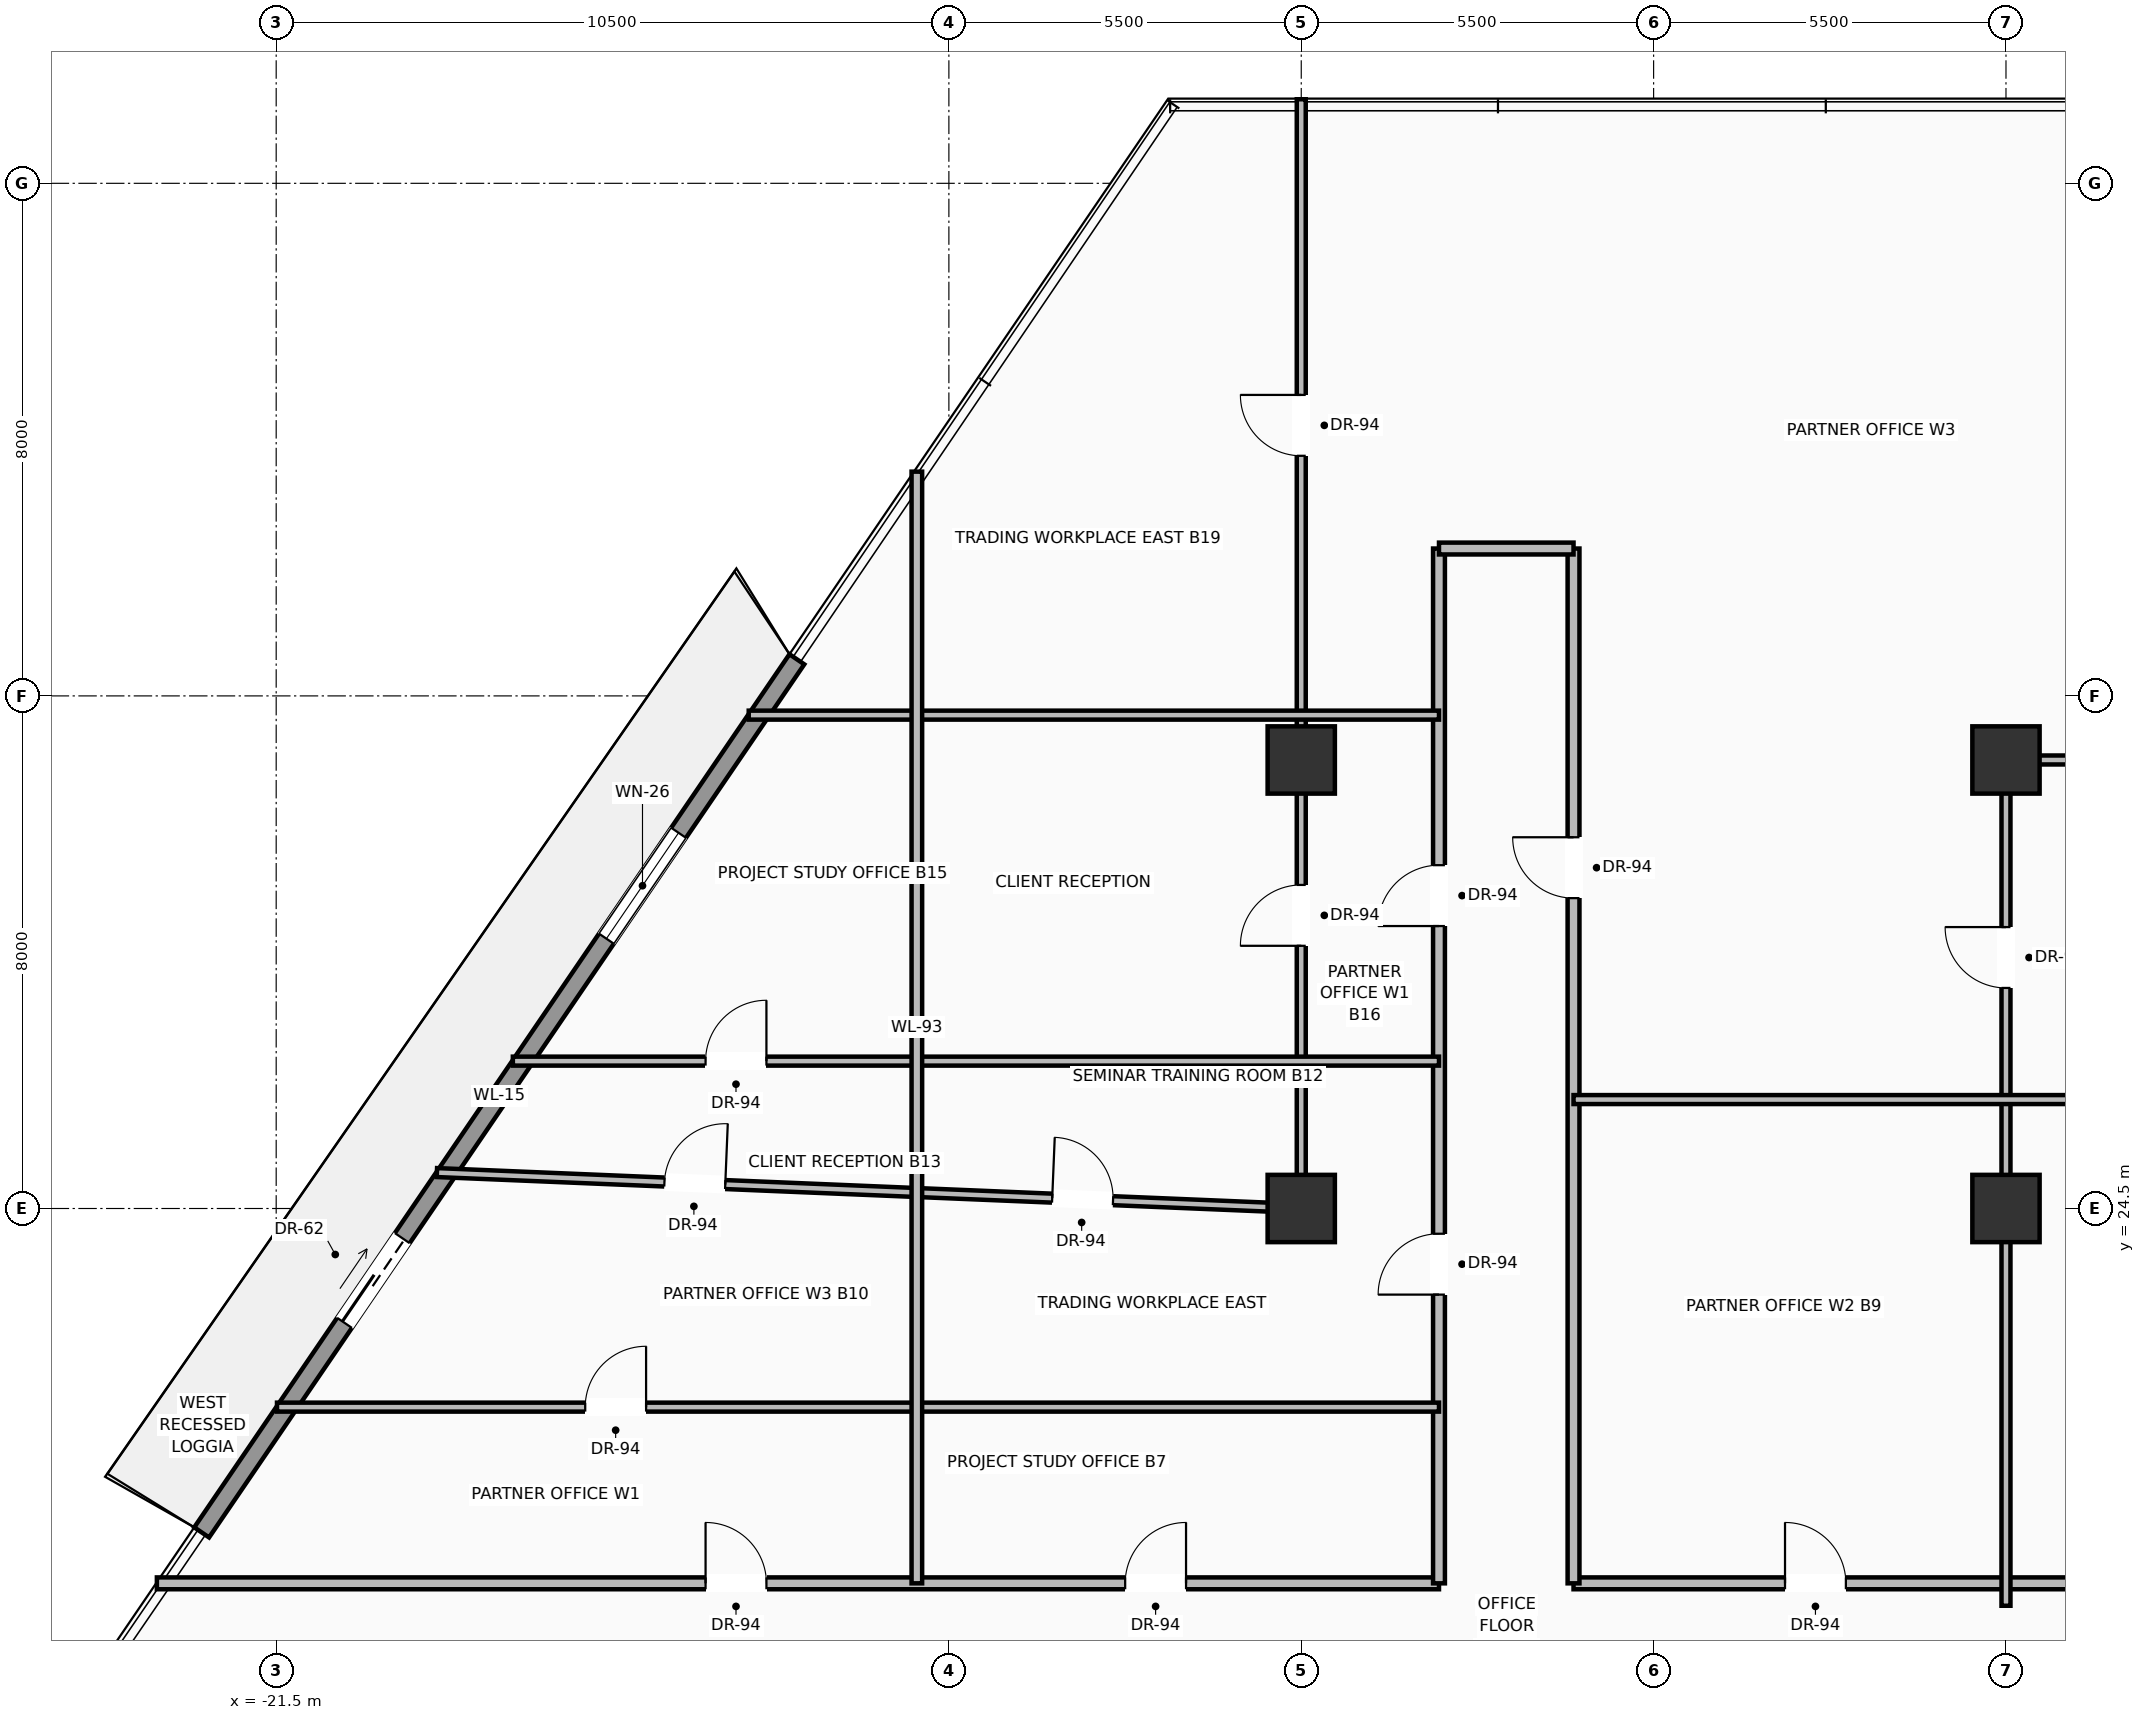
"""IFC4 building model, lengths in metres.
Left out: names, types, materials, properties, quantities, classifications, styles, units other than length and angle.
Written with IfcOpenShell. Run it as: python <this file> out.ifc"""

import sys

from ifc_helpers import new_model, si_unit, direction, frame, frame_2d, origin, origin_2d, place, context, subcontext, project, spatial, rectangle, extrude, source, transform, mapped, element, fill, save


model = new_model("IFC4")
c1 = context("Model", 3, precision=1e-05, world=origin(), true_north=direction((0.0, 1.0)))
c2 = subcontext(c1, "Body", "Model", "MODEL_VIEW")
j1 = project(units=[si_unit("LENGTHUNIT", "METRE"), si_unit("PLANEANGLEUNIT", "RADIAN")], contexts=[c1])
p1 = place(None, origin())
s1 = spatial("IfcSite", under=j1, at=p1, CompositionType="ELEMENT")
p2 = place(p1, origin())
s2 = spatial("IfcBuilding", under=s1, at=p2, CompositionType="ELEMENT")
p3 = place(p2, frame((0.0, 0.0, 38.6)))
s3 = spatial("IfcBuildingStorey", under=s2, at=p3, CompositionType="ELEMENT", Elevation=38.6)
m1 = source(origin(), c2, "Body", "SweptSolid", [
    extrude(rectangle(XDim=1.05, YDim=1.05, at=origin_2d()), origin(), (0.0, 0.0, 1.0), 3.7),
])
for number, where, z_axis, x_axis in (
    (1, (-5.5, 24.5, 0.0), (0.0, 0.0, 1.0), (1.0, 0.0, 0.0)),
    (2, (5.5, 24.5, 0.0), (0.0, 0.0, 1.0), (1.0, 0.0, 0.0)),
    (3, (-5.5, 31.5, 0.0), (0.0, 0.0, 1.0), (1.0, 0.0, 0.0)),
    (4, (5.5, 31.5, 0.0), (0.0, 0.0, 1.0), (1.0, 0.0, 0.0)),
):
    element("IfcColumn", number, at=place(p3, frame(where, z_axis=z_axis, x_axis=x_axis)), inside=s3, PredefinedType="COLUMN", context=c2, shape_type="MappedRepresentation", body=[
        mapped(m1, transform((0.0, 0.0, 0.0), scale=1.0)),
    ])
p4 = place(p3, frame((-22.663, 19.445, 0.0), z_axis=(0.0, 0.0, 1.0), x_axis=(0.563309723246, 0.826245820381, 0.0)))
e5 = element("IfcWall", 5, at=p4, inside=s3, PredefinedType="SOLIDWALL", context=c2, shape_type="SweptSolid", body=[
    extrude(rectangle(XDim=16.492, YDim=0.28, at=frame_2d((8.246, 0.0))), origin(), (0.0, 0.0, 1.0), 3.03),
])
p5 = place(p4, frame((3.958, 0.0, 0.0)))
e6 = element("IfcOpeningElement", 6, at=p5, cuts=e5, PredefinedType="OPENING", context=c2, shape_type="SweptSolid", body=[
    extrude(rectangle(XDim=1.6, YDim=2.35, at=frame_2d((0.8, 1.175))), frame((0.0, 0.15, 0.0), z_axis=(0.0, -1.0, 0.0), x_axis=(1.0, 0.0, 0.0)), (0.0, 0.0, 1.0), 0.3),
])
p6 = place(p4, frame((11.215, 0.0, 0.9)))
e7 = element("IfcOpeningElement", 7, at=p6, cuts=e5, PredefinedType="OPENING", context=c2, shape_type="SweptSolid", body=[
    extrude(rectangle(XDim=2.0, YDim=1.85, at=frame_2d((1.0, 0.925))), frame((0.0, 0.15, 0.0), z_axis=(0.0, -1.0, 0.0), x_axis=(1.0, 0.0, 0.0)), (0.0, 0.0, 1.0), 0.3),
])
p7 = place(p3, frame((-23.362, 18.65, 0.0), z_axis=(0.0, 0.0, 1.0), x_axis=(1.0, 0.0, 0.0)))
e8 = element("IfcWall", 8, at=p7, inside=s3, PredefinedType="PARTITIONING", context=c2, shape_type="SweptSolid", body=[
    extrude(rectangle(XDim=20.012, YDim=0.185, at=frame_2d((10.006, 0.0))), origin(), (0.0, 0.0, 1.0), 2.747),
])
p8 = place(p7, frame((8.564, 0.0, 0.0)))
e9 = element("IfcOpeningElement", 9, at=p8, cuts=e8, PredefinedType="OPENING", context=c2, shape_type="SweptSolid", body=[
    extrude(rectangle(XDim=0.95, YDim=2.2, at=frame_2d((0.475, 1.1))), frame((0.0, 0.103, 0.0), z_axis=(0.0, -1.0, 0.0), x_axis=(1.0, 0.0, 0.0)), (0.0, 0.0, 1.0), 0.205),
])
p9 = place(p7, frame((15.114, 0.0, 0.0)))
e10 = element("IfcOpeningElement", 10, at=p9, cuts=e8, PredefinedType="OPENING", context=c2, shape_type="SweptSolid", body=[
    extrude(rectangle(XDim=0.95, YDim=2.2, at=frame_2d((0.475, 1.1))), frame((0.0, 0.103, 0.0), z_axis=(0.0, -1.0, 0.0), x_axis=(1.0, 0.0, 0.0)), (0.0, 0.0, 1.0), 0.205),
])
p10 = place(p3, frame((-1.25, 18.65, 0.0), z_axis=(0.0, 0.0, 1.0), x_axis=(1.0, 0.0, 0.0)))
e11 = element("IfcWall", 11, at=p10, inside=s3, PredefinedType="PARTITIONING", context=c2, shape_type="SweptSolid", body=[
    extrude(rectangle(XDim=24.728, YDim=0.185, at=frame_2d((12.364, 0.0))), origin(), (0.0, 0.0, 1.0), 2.747),
])
p11 = place(p10, frame((13.091, 0.0, 0.0)))
e12 = element("IfcOpeningElement", 12, at=p11, cuts=e11, PredefinedType="OPENING", context=c2, shape_type="SweptSolid", body=[
    extrude(rectangle(XDim=0.95, YDim=2.2, at=frame_2d((0.475, 1.1))), frame((0.0, 0.103, 0.0), z_axis=(0.0, -1.0, 0.0), x_axis=(1.0, 0.0, 0.0)), (0.0, 0.0, 1.0), 0.205),
])
p12 = place(p10, frame((3.301, 0.0, 0.0)))
e13 = element("IfcOpeningElement", 13, at=p12, cuts=e11, PredefinedType="OPENING", context=c2, shape_type="SweptSolid", body=[
    extrude(rectangle(XDim=0.95, YDim=2.2, at=frame_2d((0.475, 1.1))), frame((0.0, 0.103, 0.0), z_axis=(0.0, -1.0, 0.0), x_axis=(1.0, 0.0, 0.0)), (0.0, 0.0, 1.0), 0.205),
])
p13 = place(p3, frame((-3.35, 18.65, 0.0), z_axis=(0.0, 0.0, 1.0), x_axis=(0.0, 1.0, 0.0)))
e14 = element("IfcWall", 14, at=p13, inside=s3, PredefinedType="PARTITIONING", context=c2, shape_type="SweptSolid", body=[
    extrude(rectangle(XDim=16.15, YDim=0.185, at=frame_2d((8.075, 0.0))), origin(), (0.0, 0.0, 1.0), 2.747),
])
p14 = place(p13, frame((4.506, 0.0, 0.0)))
e15 = element("IfcOpeningElement", 15, at=p14, cuts=e14, PredefinedType="OPENING", context=c2, shape_type="SweptSolid", body=[
    extrude(rectangle(XDim=0.95, YDim=2.2, at=frame_2d((0.475, 1.1))), frame((0.0, 0.103, 0.0), z_axis=(0.0, -1.0, 0.0), x_axis=(1.0, 0.0, 0.0)), (0.0, 0.0, 1.0), 0.205),
])
p15 = place(p13, frame((10.258, 0.0, 0.0)))
e16 = element("IfcOpeningElement", 16, at=p15, cuts=e14, PredefinedType="OPENING", context=c2, shape_type="SweptSolid", body=[
    extrude(rectangle(XDim=0.95, YDim=2.2, at=frame_2d((0.475, 1.1))), frame((0.0, 0.103, 0.0), z_axis=(0.0, -1.0, 0.0), x_axis=(1.0, 0.0, 0.0)), (0.0, 0.0, 1.0), 0.205),
])
p16 = place(p3, frame((-1.25, 18.65, 0.0), z_axis=(0.0, 0.0, 1.0), x_axis=(0.0, 1.0, 0.0)))
e17 = element("IfcWall", 17, at=p16, inside=s3, PredefinedType="PARTITIONING", context=c2, shape_type="SweptSolid", body=[
    extrude(rectangle(XDim=16.15, YDim=0.185, at=frame_2d((8.075, 0.0))), origin(), (0.0, 0.0, 1.0), 2.747),
])
p17 = place(p16, frame((10.694, 0.0, 0.0)))
e18 = element("IfcOpeningElement", 18, at=p17, cuts=e17, PredefinedType="OPENING", context=c2, shape_type="SweptSolid", body=[
    extrude(rectangle(XDim=0.95, YDim=2.2, at=frame_2d((0.475, 1.1))), frame((0.0, 0.103, 0.0), z_axis=(0.0, -1.0, 0.0), x_axis=(1.0, 0.0, 0.0)), (0.0, 0.0, 1.0), 0.205),
])
p18 = place(p3, frame((-3.35, 34.8, 0.0), z_axis=(0.0, 0.0, 1.0), x_axis=(1.0, 0.0, 0.0)))
e19 = element("IfcWall", 19, at=p18, inside=s3, PredefinedType="PARTITIONING", context=c2, shape_type="SweptSolid", body=[
    extrude(rectangle(XDim=2.1, YDim=0.185, at=frame_2d((1.05, 0.0))), origin(), (0.0, 0.0, 1.0), 2.979),
])
p19 = place(p3, frame((-5.5, 24.5, 0.0), z_axis=(0.0, 0.0, 1.0), x_axis=(0.0, 1.0, 0.0)))
e20 = element("IfcWall", 20, at=p19, inside=s3, PredefinedType="PARTITIONING", context=c2, shape_type="SweptSolid", body=[
    extrude(rectangle(XDim=17.312, YDim=0.14, at=frame_2d((8.656, 0.0))), origin(), (0.0, 0.0, 1.0), 2.747),
])
p20 = place(p19, frame((11.747, 0.0, 0.0)))
e21 = element("IfcOpeningElement", 21, at=p20, cuts=e20, PredefinedType="OPENING", context=c2, shape_type="SweptSolid", body=[
    extrude(rectangle(XDim=0.95, YDim=2.2, at=frame_2d((0.475, 1.1))), frame((0.0, 0.08, 0.0), z_axis=(0.0, -1.0, 0.0), x_axis=(1.0, 0.0, 0.0)), (0.0, 0.0, 1.0), 0.16),
])
p21 = place(p19, frame((4.1, 0.0, 0.0)))
e22 = element("IfcOpeningElement", 22, at=p21, cuts=e20, PredefinedType="OPENING", context=c2, shape_type="SweptSolid", body=[
    extrude(rectangle(XDim=0.95, YDim=2.2, at=frame_2d((0.475, 1.1))), frame((0.0, 0.08, 0.0), z_axis=(0.0, -1.0, 0.0), x_axis=(1.0, 0.0, 0.0)), (0.0, 0.0, 1.0), 0.16),
])
p22 = place(p3, frame((5.5, 18.3, 0.0), z_axis=(0.0, 0.0, 1.0), x_axis=(0.0, 1.0, 0.0)))
e23 = element("IfcWall", 23, at=p22, inside=s3, PredefinedType="PARTITIONING", context=c2, shape_type="SweptSolid", body=[
    extrude(rectangle(XDim=13.2, YDim=0.14, at=frame_2d((6.6, 0.0))), origin(), (0.0, 0.0, 1.0), 2.747),
])
p23 = place(p22, frame((9.642, 0.0, 0.0)))
e24 = element("IfcOpeningElement", 24, at=p23, cuts=e23, PredefinedType="OPENING", context=c2, shape_type="SweptSolid", body=[
    extrude(rectangle(XDim=0.95, YDim=2.2, at=frame_2d((0.475, 1.1))), frame((0.0, 0.08, 0.0), z_axis=(0.0, -1.0, 0.0), x_axis=(1.0, 0.0, 0.0)), (0.0, 0.0, 1.0), 0.16),
])
p24 = place(p3, frame((-18.992, 25.061, 0.0), z_axis=(0.0, 0.0, 1.0), x_axis=(0.999137266833, -0.041529772754, 0.0)))
e25 = element("IfcWall", 25, at=p24, inside=s3, PredefinedType="PARTITIONING", context=c2, shape_type="SweptSolid", body=[
    extrude(rectangle(XDim=13.503, YDim=0.14, at=frame_2d((6.752, 0.0))), origin(), (0.0, 0.0, 1.0), 2.747),
])
p25 = place(p24, frame((9.613, 0.0, 0.0)))
e26 = element("IfcOpeningElement", 26, at=p25, cuts=e25, PredefinedType="OPENING", context=c2, shape_type="SweptSolid", body=[
    extrude(rectangle(XDim=0.95, YDim=2.2, at=frame_2d((0.475, 1.1))), frame((0.0, 0.08, 0.0), z_axis=(0.0, -1.0, 0.0), x_axis=(1.0, 0.0, 0.0)), (0.0, 0.0, 1.0), 0.16),
])
p26 = place(p24, frame((3.555, 0.0, 0.0)))
e27 = element("IfcOpeningElement", 27, at=p26, cuts=e25, PredefinedType="OPENING", context=c2, shape_type="SweptSolid", body=[
    extrude(rectangle(XDim=0.95, YDim=2.2, at=frame_2d((0.475, 1.1))), frame((0.0, 0.08, 0.0), z_axis=(0.0, -1.0, 0.0), x_axis=(1.0, 0.0, 0.0)), (0.0, 0.0, 1.0), 0.16),
])
p27 = place(p3, frame((5.5, 31.5, 0.0), z_axis=(0.0, 0.0, 1.0), x_axis=(1.0, 0.0, 0.0)))
e28 = element("IfcWall", 28, at=p27, inside=s3, PredefinedType="PARTITIONING", context=c2, shape_type="SweptSolid", body=[
    extrude(rectangle(XDim=9.296, YDim=0.14, at=frame_2d((4.648, 0.0))), origin(), (0.0, 0.0, 1.0), 2.747),
])
p28 = place(p3, frame((-21.487, 21.4, 0.0), z_axis=(0.0, 0.0, 1.0), x_axis=(1.0, 0.0, 0.0)))
e29 = element("IfcWall", 29, at=p28, inside=s3, PredefinedType="PARTITIONING", context=c2, shape_type="SweptSolid", body=[
    extrude(rectangle(XDim=18.137, YDim=0.14, at=frame_2d((9.069, 0.0))), origin(), (0.0, 0.0, 1.0), 2.747),
])
p29 = place(p28, frame((4.811, 0.0, 0.0)))
e30 = element("IfcOpeningElement", 30, at=p29, cuts=e29, PredefinedType="OPENING", context=c2, shape_type="SweptSolid", body=[
    extrude(rectangle(XDim=0.95, YDim=2.2, at=frame_2d((0.475, 1.1))), frame((0.0, 0.08, 0.0), z_axis=(0.0, -1.0, 0.0), x_axis=(1.0, 0.0, 0.0)), (0.0, 0.0, 1.0), 0.16),
])
p30 = place(p3, frame((-17.806, 26.8, 0.0), z_axis=(0.0, 0.0, 1.0), x_axis=(1.0, 0.0, 0.0)))
e31 = element("IfcWall", 31, at=p30, inside=s3, PredefinedType="PARTITIONING", context=c2, shape_type="SweptSolid", body=[
    extrude(rectangle(XDim=14.456, YDim=0.14, at=frame_2d((7.228, 0.0))), origin(), (0.0, 0.0, 1.0), 2.747),
])
p31 = place(p30, frame((3.008, 0.0, 0.0)))
e32 = element("IfcOpeningElement", 32, at=p31, cuts=e31, PredefinedType="OPENING", context=c2, shape_type="SweptSolid", body=[
    extrude(rectangle(XDim=0.95, YDim=2.2, at=frame_2d((0.475, 1.1))), frame((0.0, 0.08, 0.0), z_axis=(0.0, -1.0, 0.0), x_axis=(1.0, 0.0, 0.0)), (0.0, 0.0, 1.0), 0.16),
])
p32 = place(p3, frame((-14.124, 32.2, 0.0), z_axis=(0.0, 0.0, 1.0), x_axis=(1.0, 0.0, 0.0)))
e33 = element("IfcWall", 33, at=p32, inside=s3, PredefinedType="PARTITIONING", context=c2, shape_type="SweptSolid", body=[
    extrude(rectangle(XDim=10.774, YDim=0.14, at=frame_2d((5.387, 0.0))), origin(), (0.0, 0.0, 1.0), 2.747),
])
p33 = place(p3, frame((-1.25, 26.2, 0.0), z_axis=(0.0, 0.0, 1.0), x_axis=(1.0, 0.0, 0.0)))
e34 = element("IfcWall", 34, at=p33, inside=s3, PredefinedType="PARTITIONING", context=c2, shape_type="SweptSolid", body=[
    extrude(rectangle(XDim=19.627, YDim=0.14, at=frame_2d((9.813, 0.0))), origin(), (0.0, 0.0, 1.0), 2.747),
])
p34 = place(p3, frame((-11.5, 18.65, 0.0), z_axis=(0.0, 0.0, 1.0), x_axis=(0.0, 1.0, 0.0)))
e35 = element("IfcWall", 35, at=p34, inside=s3, PredefinedType="PARTITIONING", context=c2, shape_type="SweptSolid", body=[
    extrude(rectangle(XDim=17.35, YDim=0.165, at=frame_2d((8.675, 0.0))), origin(), (0.0, 0.0, 1.0), 2.747),
])
m2 = source(origin(), c2, "Body", "SweptSolid", [
    extrude(rectangle(XDim=1.6, YDim=2.35, at=frame_2d((0.8, 1.175))), frame((0.0, 0.025, 0.0), z_axis=(0.0, -1.0, 0.0), x_axis=(1.0, 0.0, 0.0)), (0.0, 0.0, 1.0), 0.05),
])
p35 = place(p5, origin())
e36 = element("IfcDoor", 36, at=p35, inside=s3, OperationType="SLIDING_TO_LEFT", PredefinedType="DOOR", context=c2, shape_type="MappedRepresentation", body=[
    mapped(m2, transform((0.0, 0.0, 0.0), scale=1.0)),
])
fill(e6, e36)
m3 = source(origin(), c2, "Body", "SweptSolid", [
    extrude(rectangle(XDim=2.0, YDim=1.85, at=frame_2d((1.0, 0.925))), frame((0.0, 0.03, 0.0), z_axis=(0.0, -1.0, 0.0), x_axis=(1.0, 0.0, 0.0)), (0.0, 0.0, 1.0), 0.06),
])
p36 = place(p6, origin())
e37 = element("IfcWindow", 37, at=p36, inside=s3, PartitioningType="SINGLE_PANEL", PredefinedType="WINDOW", context=c2, shape_type="MappedRepresentation", body=[
    mapped(m3, transform((0.0, 0.0, 0.0), scale=1.0)),
])
fill(e7, e37)
m4 = source(origin(), c2, "Body", "SweptSolid", [
    extrude(rectangle(XDim=0.95, YDim=2.2, at=frame_2d((0.475, 1.1))), frame((0.0, 0.025, 0.0), z_axis=(0.0, -1.0, 0.0), x_axis=(1.0, 0.0, 0.0)), (0.0, 0.0, 1.0), 0.05),
])
p37 = place(p8, origin())
e38 = element("IfcDoor", 38, at=p37, inside=s3, OperationType="SINGLE_SWING_LEFT", PredefinedType="DOOR", context=c2, shape_type="MappedRepresentation", body=[
    mapped(m4, transform((0.0, 0.0, 0.0), scale=1.0)),
])
fill(e9, e38)
p38 = place(p14, origin())
e39 = element("IfcDoor", 39, at=p38, inside=s3, OperationType="SINGLE_SWING_LEFT", PredefinedType="DOOR", context=c2, shape_type="MappedRepresentation", body=[
    mapped(m4, transform((0.0, 0.0, 0.0), scale=1.0)),
])
fill(e15, e39)
p39 = place(p17, origin())
e40 = element("IfcDoor", 40, at=p39, inside=s3, OperationType="SINGLE_SWING_RIGHT", PredefinedType="DOOR", context=c2, shape_type="MappedRepresentation", body=[
    mapped(m4, transform((0.0, 0.0, 0.0), scale=1.0)),
])
fill(e18, e40)
p40 = place(p9, origin())
e41 = element("IfcDoor", 41, at=p40, inside=s3, OperationType="SINGLE_SWING_RIGHT", PredefinedType="DOOR", context=c2, shape_type="MappedRepresentation", body=[
    mapped(m4, transform((0.0, 0.0, 0.0), scale=1.0)),
])
fill(e10, e41)
p41 = place(p12, origin())
e42 = element("IfcDoor", 42, at=p41, inside=s3, OperationType="SINGLE_SWING_LEFT", PredefinedType="DOOR", context=c2, shape_type="MappedRepresentation", body=[
    mapped(m4, transform((0.0, 0.0, 0.0), scale=1.0)),
])
fill(e13, e42)
p42 = place(p29, origin())
e43 = element("IfcDoor", 43, at=p42, inside=s3, OperationType="SINGLE_SWING_RIGHT", PredefinedType="DOOR", context=c2, shape_type="MappedRepresentation", body=[
    mapped(m4, transform((0.0, 0.0, 0.0), scale=1.0)),
])
fill(e30, e43)
p43 = place(p25, origin())
e44 = element("IfcDoor", 44, at=p43, inside=s3, OperationType="SINGLE_SWING_LEFT", PredefinedType="DOOR", context=c2, shape_type="MappedRepresentation", body=[
    mapped(m4, transform((0.0, 0.0, 0.0), scale=1.0)),
])
fill(e26, e44)
p44 = place(p23, origin())
e45 = element("IfcDoor", 45, at=p44, inside=s3, OperationType="SINGLE_SWING_RIGHT", PredefinedType="DOOR", context=c2, shape_type="MappedRepresentation", body=[
    mapped(m4, transform((0.0, 0.0, 0.0), scale=1.0)),
])
fill(e24, e45)
p45 = place(p15, origin())
e46 = element("IfcDoor", 46, at=p45, inside=s3, OperationType="SINGLE_SWING_LEFT", PredefinedType="DOOR", context=c2, shape_type="MappedRepresentation", body=[
    mapped(m4, transform((0.0, 0.0, 0.0), scale=1.0)),
])
fill(e16, e46)
p46 = place(p20, origin())
e47 = element("IfcDoor", 47, at=p46, inside=s3, OperationType="SINGLE_SWING_RIGHT", PredefinedType="DOOR", context=c2, shape_type="MappedRepresentation", body=[
    mapped(m4, transform((0.0, 0.0, 0.0), scale=1.0)),
])
fill(e21, e47)
p47 = place(p26, origin())
e48 = element("IfcDoor", 48, at=p47, inside=s3, OperationType="SINGLE_SWING_RIGHT", PredefinedType="DOOR", context=c2, shape_type="MappedRepresentation", body=[
    mapped(m4, transform((0.0, 0.0, 0.0), scale=1.0)),
])
fill(e27, e48)
p48 = place(p21, origin())
e49 = element("IfcDoor", 49, at=p48, inside=s3, OperationType="SINGLE_SWING_LEFT", PredefinedType="DOOR", context=c2, shape_type="MappedRepresentation", body=[
    mapped(m4, transform((0.0, 0.0, 0.0), scale=1.0)),
])
fill(e22, e49)
p49 = place(p31, origin())
e50 = element("IfcDoor", 50, at=p49, inside=s3, OperationType="SINGLE_SWING_RIGHT", PredefinedType="DOOR", context=c2, shape_type="MappedRepresentation", body=[
    mapped(m4, transform((0.0, 0.0, 0.0), scale=1.0)),
])
fill(e32, e50)
save(model, sys.argv[1])
